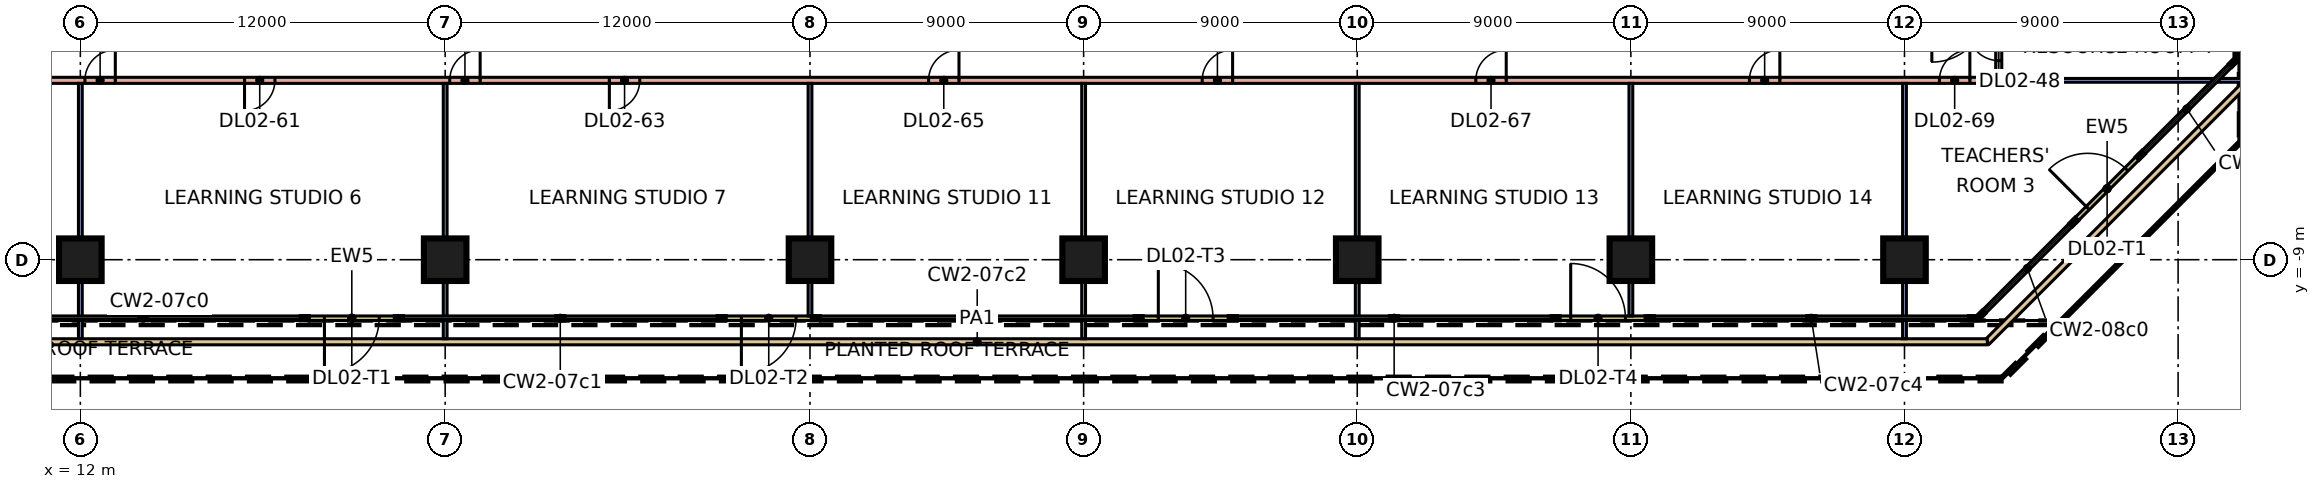
"""IFC4 building model, lengths in metres.
Left out: names, types, materials, properties, quantities, classifications, styles, units other than length and angle.
Written with IfcOpenShell. Run it as: python <this file> out.ifc"""

import sys

from ifc_helpers import new_model, si_unit, direction, frame, frame_2d, origin, origin_2d, place, context, subcontext, project, spatial, rectangle, extrude, element, fill, save


model = new_model("IFC4")
c1 = context("Model", 3, precision=1e-05, world=origin(), true_north=direction((0.0, 1.0)))
c2 = subcontext(c1, "Body", "Model", "MODEL_VIEW")
j1 = project(units=[si_unit("LENGTHUNIT", "METRE"), si_unit("PLANEANGLEUNIT", "RADIAN")], contexts=[c1])
p1 = place(None, origin())
s1 = spatial("IfcSite", under=j1, at=p1, CompositionType="ELEMENT")
p2 = place(p1, origin())
s2 = spatial("IfcBuilding", under=s1, at=p2, CompositionType="ELEMENT")
p3 = place(p2, frame((0.0, 0.0, 12.0)))
s3 = spatial("IfcBuildingStorey", under=s2, at=p3, CompositionType="ELEMENT", Elevation=12.0)
for number, where, z_axis, x_axis in (
    (1, (12.0, -9.0, 0.0), (0.0, 0.0, 1.0), (1.0, 0.0, 0.0)),
    (2, (24.0, -9.0, 0.0), (0.0, 0.0, 1.0), (1.0, 0.0, 0.0)),
    (3, (36.0, -9.0, 0.0), (0.0, 0.0, 1.0), (1.0, 0.0, 0.0)),
    (4, (45.0, -9.0, 0.0), (0.0, 0.0, 1.0), (1.0, 0.0, 0.0)),
    (5, (54.0, -9.0, 0.0), (0.0, 0.0, 1.0), (1.0, 0.0, 0.0)),
    (6, (63.0, -9.0, 0.0), (0.0, 0.0, 1.0), (1.0, 0.0, 0.0)),
    (7, (72.0, -9.0, 0.0), (0.0, 0.0, 1.0), (1.0, 0.0, 0.0)),
):
    element("IfcColumn", number, at=place(p3, frame(where, z_axis=z_axis, x_axis=x_axis)), inside=s3, PredefinedType="COLUMN", context=c2, shape_type="SweptSolid", body=[
        extrude(rectangle(XDim=1.4, YDim=1.4, at=origin_2d()), origin(), (0.0, 0.0, 1.0), 4.8),
    ])
p4 = place(p3, frame((19.429, -10.925, 0.0), z_axis=(0.0, 0.0, 1.0), x_axis=(1.0, 0.0, 0.0)))
e8 = element("IfcWall", 8, at=p4, inside=s3, PredefinedType="SOLIDWALL", context=c2, shape_type="SweptSolid", body=[
    extrude(rectangle(XDim=3.0, YDim=0.15, at=frame_2d((1.5, 0.0))), origin(), (0.0, 0.0, 1.0), 4.4),
])
p5 = place(p4, frame((0.6, 0.0, 0.0)))
e9 = element("IfcOpeningElement", 9, at=p5, cuts=e8, PredefinedType="OPENING", context=c2, shape_type="SweptSolid", body=[
    extrude(rectangle(XDim=1.8, YDim=2.4, at=frame_2d((0.9, 1.2))), frame((0.0, 0.085, 0.0), z_axis=(0.0, -1.0, 0.0), x_axis=(1.0, 0.0, 0.0)), (0.0, 0.0, 1.0), 0.17),
])
p6 = place(p3, frame((33.143, -10.925, 0.0), z_axis=(0.0, 0.0, 1.0), x_axis=(1.0, 0.0, 0.0)))
e10 = element("IfcWall", 10, at=p6, inside=s3, PredefinedType="SOLIDWALL", context=c2, shape_type="SweptSolid", body=[
    extrude(rectangle(XDim=3.0, YDim=0.15, at=frame_2d((1.5, 0.0))), origin(), (0.0, 0.0, 1.0), 4.4),
])
p7 = place(p6, frame((0.6, 0.0, 0.0)))
e11 = element("IfcOpeningElement", 11, at=p7, cuts=e10, PredefinedType="OPENING", context=c2, shape_type="SweptSolid", body=[
    extrude(rectangle(XDim=1.8, YDim=2.4, at=frame_2d((0.9, 1.2))), frame((0.0, 0.085, 0.0), z_axis=(0.0, -1.0, 0.0), x_axis=(1.0, 0.0, 0.0)), (0.0, 0.0, 1.0), 0.17),
])
p8 = place(p3, frame((46.857, -10.925, 0.0), z_axis=(0.0, 0.0, 1.0), x_axis=(1.0, 0.0, 0.0)))
e12 = element("IfcWall", 12, at=p8, inside=s3, PredefinedType="SOLIDWALL", context=c2, shape_type="SweptSolid", body=[
    extrude(rectangle(XDim=3.0, YDim=0.15, at=frame_2d((1.5, 0.0))), origin(), (0.0, 0.0, 1.0), 4.4),
])
p9 = place(p8, frame((0.6, 0.0, 0.0)))
e13 = element("IfcOpeningElement", 13, at=p9, cuts=e12, PredefinedType="OPENING", context=c2, shape_type="SweptSolid", body=[
    extrude(rectangle(XDim=1.8, YDim=2.4, at=frame_2d((0.9, 1.2))), frame((0.0, 0.085, 0.0), z_axis=(0.0, -1.0, 0.0), x_axis=(1.0, 0.0, 0.0)), (0.0, 0.0, 1.0), 0.17),
])
p10 = place(p3, frame((60.571, -10.925, 0.0), z_axis=(0.0, 0.0, 1.0), x_axis=(1.0, 0.0, 0.0)))
e14 = element("IfcWall", 14, at=p10, inside=s3, PredefinedType="SOLIDWALL", context=c2, shape_type="SweptSolid", body=[
    extrude(rectangle(XDim=3.0, YDim=0.15, at=frame_2d((1.5, 0.0))), origin(), (0.0, 0.0, 1.0), 4.4),
])
p11 = place(p10, frame((0.45, 0.0, 0.0)))
e15 = element("IfcOpeningElement", 15, at=p11, cuts=e14, PredefinedType="OPENING", context=c2, shape_type="SweptSolid", body=[
    extrude(rectangle(XDim=1.8, YDim=2.4, at=frame_2d((0.9, 1.2))), frame((0.0, 0.085, 0.0), z_axis=(0.0, -1.0, 0.0), x_axis=(1.0, 0.0, 0.0)), (0.0, 0.0, 1.0), 0.17),
])
p12 = place(p3, frame((77.604, -7.725, 0.0), z_axis=(0.0, 0.0, 1.0), x_axis=(0.707106781187, 0.707106781187, 0.0)))
e16 = element("IfcWall", 16, at=p12, inside=s3, PredefinedType="SOLIDWALL", context=c2, shape_type="SweptSolid", body=[
    extrude(rectangle(XDim=3.0, YDim=0.15, at=frame_2d((1.5, 0.0))), origin(), (0.0, 0.0, 1.0), 4.4),
])
p13 = place(p12, frame((0.6, 0.0, 0.0)))
e17 = element("IfcOpeningElement", 17, at=p13, cuts=e16, PredefinedType="OPENING", context=c2, shape_type="SweptSolid", body=[
    extrude(rectangle(XDim=1.8, YDim=2.4, at=frame_2d((0.9, 1.2))), frame((0.0, 0.085, 0.0), z_axis=(0.0, -1.0, 0.0), x_axis=(1.0, 0.0, 0.0)), (0.0, 0.0, 1.0), 0.17),
])
p14 = place(p3, frame((83.7, -2.725, 0.0), z_axis=(0.0, 0.0, 1.0), x_axis=(-0.707106781187, -0.707106781187, 0.0)))
e18 = element("IfcWall", 18, at=p14, inside=s3, PredefinedType="PARAPET", context=c2, shape_type="SweptSolid", body=[
    extrude(rectangle(XDim=12.692, YDim=0.2, at=frame_2d((6.346, 0.0))), origin(), (0.0, 0.0, 1.0), 0.5),
])
p15 = place(p3, frame((74.725, -11.7, 0.0), z_axis=(0.0, 0.0, 1.0), x_axis=(-1.0, 0.0, 0.0)))
e19 = element("IfcWall", 19, at=p15, inside=s3, PredefinedType="PARAPET", context=c2, shape_type="SweptSolid", body=[
    extrude(rectangle(XDim=66.45, YDim=0.2, at=frame_2d((33.225, 0.0))), origin(), (0.0, 0.0, 1.0), 0.5),
])
p16 = place(p3, frame((-0.184, -3.1, 0.0), z_axis=(0.0, 0.0, 1.0), x_axis=(1.0, 0.0, 0.0)))
e20 = element("IfcWall", 20, at=p16, inside=s3, PredefinedType="PARTITIONING", context=c2, shape_type="SweptSolid", body=[
    extrude(rectangle(XDim=75.284, YDim=0.2, at=frame_2d((37.642, 0.0))), origin(), (0.0, 0.0, 1.0), 4.4),
])
p17 = place(p16, frame((6.105, 0.0, 0.0)))
e21 = element("IfcOpeningElement", 21, at=p17, cuts=e20, PredefinedType="OPENING", context=c2, shape_type="SweptSolid", body=[
    extrude(rectangle(XDim=1.0, YDim=2.1, at=frame_2d((0.5, 1.05))), frame((0.0, 0.11, 0.0), z_axis=(0.0, -1.0, 0.0), x_axis=(1.0, 0.0, 0.0)), (0.0, 0.0, 1.0), 0.22),
])
p18 = place(p16, frame((17.584, 0.0, 0.0)))
e22 = element("IfcOpeningElement", 22, at=p18, cuts=e20, PredefinedType="OPENING", context=c2, shape_type="SweptSolid", body=[
    extrude(rectangle(XDim=1.0, YDim=2.1, at=frame_2d((0.5, 1.05))), frame((0.0, 0.11, 0.0), z_axis=(0.0, -1.0, 0.0), x_axis=(1.0, 0.0, 0.0)), (0.0, 0.0, 1.0), 0.22),
])
p19 = place(p16, frame((12.334, 0.0, 0.0)))
e23 = element("IfcOpeningElement", 23, at=p19, cuts=e20, PredefinedType="OPENING", context=c2, shape_type="SweptSolid", body=[
    extrude(rectangle(XDim=1.0, YDim=2.1, at=frame_2d((0.5, 1.05))), frame((0.0, 0.11, 0.0), z_axis=(0.0, -1.0, 0.0), x_axis=(1.0, 0.0, 0.0)), (0.0, 0.0, 1.0), 0.22),
])
p20 = place(p16, frame((29.584, 0.0, 0.0)))
e24 = element("IfcOpeningElement", 24, at=p20, cuts=e20, PredefinedType="OPENING", context=c2, shape_type="SweptSolid", body=[
    extrude(rectangle(XDim=1.0, YDim=2.1, at=frame_2d((0.5, 1.05))), frame((0.0, 0.11, 0.0), z_axis=(0.0, -1.0, 0.0), x_axis=(1.0, 0.0, 0.0)), (0.0, 0.0, 1.0), 0.22),
])
p21 = place(p16, frame((24.334, 0.0, 0.0)))
e25 = element("IfcOpeningElement", 25, at=p21, cuts=e20, PredefinedType="OPENING", context=c2, shape_type="SweptSolid", body=[
    extrude(rectangle(XDim=1.0, YDim=2.1, at=frame_2d((0.5, 1.05))), frame((0.0, 0.11, 0.0), z_axis=(0.0, -1.0, 0.0), x_axis=(1.0, 0.0, 0.0)), (0.0, 0.0, 1.0), 0.22),
])
p22 = place(p16, frame((40.084, 0.0, 0.0)))
e26 = element("IfcOpeningElement", 26, at=p22, cuts=e20, PredefinedType="OPENING", context=c2, shape_type="SweptSolid", body=[
    extrude(rectangle(XDim=1.0, YDim=2.1, at=frame_2d((0.5, 1.05))), frame((0.0, 0.11, 0.0), z_axis=(0.0, -1.0, 0.0), x_axis=(1.0, 0.0, 0.0)), (0.0, 0.0, 1.0), 0.22),
])
p23 = place(p16, frame((49.084, 0.0, 0.0)))
e27 = element("IfcOpeningElement", 27, at=p23, cuts=e20, PredefinedType="OPENING", context=c2, shape_type="SweptSolid", body=[
    extrude(rectangle(XDim=1.0, YDim=2.1, at=frame_2d((0.5, 1.05))), frame((0.0, 0.11, 0.0), z_axis=(0.0, -1.0, 0.0), x_axis=(1.0, 0.0, 0.0)), (0.0, 0.0, 1.0), 0.22),
])
p24 = place(p16, frame((58.084, 0.0, 0.0)))
e28 = element("IfcOpeningElement", 28, at=p24, cuts=e20, PredefinedType="OPENING", context=c2, shape_type="SweptSolid", body=[
    extrude(rectangle(XDim=1.0, YDim=2.1, at=frame_2d((0.5, 1.05))), frame((0.0, 0.11, 0.0), z_axis=(0.0, -1.0, 0.0), x_axis=(1.0, 0.0, 0.0)), (0.0, 0.0, 1.0), 0.22),
])
p25 = place(p16, frame((67.084, 0.0, 0.0)))
e29 = element("IfcOpeningElement", 29, at=p25, cuts=e20, PredefinedType="OPENING", context=c2, shape_type="SweptSolid", body=[
    extrude(rectangle(XDim=1.0, YDim=2.1, at=frame_2d((0.5, 1.05))), frame((0.0, 0.11, 0.0), z_axis=(0.0, -1.0, 0.0), x_axis=(1.0, 0.0, 0.0)), (0.0, 0.0, 1.0), 0.22),
])
p26 = place(p16, frame((73.334, 0.0, 0.0)))
e30 = element("IfcOpeningElement", 30, at=p26, cuts=e20, PredefinedType="OPENING", context=c2, shape_type="SweptSolid", body=[
    extrude(rectangle(XDim=1.0, YDim=2.1, at=frame_2d((0.5, 1.05))), frame((0.0, 0.11, 0.0), z_axis=(0.0, -1.0, 0.0), x_axis=(1.0, 0.0, 0.0)), (0.0, 0.0, 1.0), 0.22),
])
for number, where, z_axis, x_axis in (
    (31, (12.0, -11.6, 0.0), (0.0, 0.0, 1.0), (0.0, 1.0, 0.0)),
    (32, (24.0, -11.6, 0.0), (0.0, 0.0, 1.0), (0.0, 1.0, 0.0)),
):
    element("IfcWall", number, at=place(p3, frame(where, z_axis=z_axis, x_axis=x_axis)), inside=s3, PredefinedType="PARTITIONING", context=c2, shape_type="SweptSolid", body=[
        extrude(rectangle(XDim=8.4, YDim=0.125, at=frame_2d((4.2, 0.0))), origin(), (0.0, 0.0, 1.0), 4.4),
    ])
p27 = place(p3, frame((36.0, -10.851, 0.0), z_axis=(0.0, 0.0, 1.0), x_axis=(0.0, 1.0, 0.0)))
e33 = element("IfcWall", 33, at=p27, inside=s3, PredefinedType="PARTITIONING", context=c2, shape_type="SweptSolid", body=[
    extrude(rectangle(XDim=7.651, YDim=0.125, at=frame_2d((3.826, 0.0))), origin(), (0.0, 0.0, 1.0), 4.4),
])
for number, where, z_axis, x_axis in (
    (34, (45.0, -11.6, 0.0), (0.0, 0.0, 1.0), (0.0, 1.0, 0.0)),
    (35, (54.0, -11.6, 0.0), (0.0, 0.0, 1.0), (0.0, 1.0, 0.0)),
):
    element("IfcWall", number, at=place(p3, frame(where, z_axis=z_axis, x_axis=x_axis)), inside=s3, PredefinedType="PARTITIONING", context=c2, shape_type="SweptSolid", body=[
        extrude(rectangle(XDim=8.4, YDim=0.125, at=frame_2d((4.2, 0.0))), origin(), (0.0, 0.0, 1.0), 4.4),
    ])
p28 = place(p3, frame((63.0, -10.851, 0.0), z_axis=(0.0, 0.0, 1.0), x_axis=(0.0, 1.0, 0.0)))
e36 = element("IfcWall", 36, at=p28, inside=s3, PredefinedType="PARTITIONING", context=c2, shape_type="SweptSolid", body=[
    extrude(rectangle(XDim=7.651, YDim=0.125, at=frame_2d((3.826, 0.0))), origin(), (0.0, 0.0, 1.0), 4.4),
])
p29 = place(p3, frame((72.0, -11.6, 0.0), z_axis=(0.0, 0.0, 1.0), x_axis=(0.0, 1.0, 0.0)))
e37 = element("IfcWall", 37, at=p29, inside=s3, PredefinedType="PARTITIONING", context=c2, shape_type="SweptSolid", body=[
    extrude(rectangle(XDim=8.4, YDim=0.125, at=frame_2d((4.2, 0.0))), origin(), (0.0, 0.0, 1.0), 4.4),
])
p30 = place(p3, frame((75.1, -3.1, 0.0), z_axis=(0.0, 0.0, 1.0), x_axis=(1.0, 0.0, 0.0)))
e38 = element("IfcWall", 38, at=p30, inside=s3, PredefinedType="PARTITIONING", context=c2, shape_type="SweptSolid", body=[
    extrude(rectangle(XDim=8.083, YDim=0.125, at=frame_2d((4.042, 0.0))), origin(), (0.0, 0.0, 1.0), 4.4),
])
p31 = place(p3, frame((75.1, -3.0, 0.0), z_axis=(0.0, 0.0, 1.0), x_axis=(0.0, 1.0, 0.0)))
e39 = element("IfcWall", 39, at=p31, inside=s3, PredefinedType="PARTITIONING", context=c2, shape_type="SweptSolid", body=[
    extrude(rectangle(XDim=30.0, YDim=0.2, at=frame_2d((15.0, 0.0))), origin(), (0.0, 0.0, 1.0), 4.4),
])
p32 = place(p31, frame((0.55, 0.0, 0.0)))
e40 = element("IfcOpeningElement", 40, at=p32, cuts=e39, PredefinedType="OPENING", context=c2, shape_type="SweptSolid", body=[
    extrude(rectangle(XDim=1.0, YDim=2.1, at=frame_2d((0.5, 1.05))), frame((0.0, 0.11, 0.0), z_axis=(0.0, -1.0, 0.0), x_axis=(1.0, 0.0, 0.0)), (0.0, 0.0, 1.0), 0.22),
])
p33 = place(p31, frame((8.4, 0.0, 0.0)))
e41 = element("IfcOpeningElement", 41, at=p33, cuts=e39, PredefinedType="OPENING", context=c2, shape_type="SweptSolid", body=[
    extrude(rectangle(XDim=1.0, YDim=2.1, at=frame_2d((0.5, 1.05))), frame((0.0, 0.11, 0.0), z_axis=(0.0, -1.0, 0.0), x_axis=(1.0, 0.0, 0.0)), (0.0, 0.0, 1.0), 0.22),
])
p34 = place(p31, frame((3.15, 0.0, 0.0)))
e42 = element("IfcOpeningElement", 42, at=p34, cuts=e39, PredefinedType="OPENING", context=c2, shape_type="SweptSolid", body=[
    extrude(rectangle(XDim=1.0, YDim=2.1, at=frame_2d((0.5, 1.05))), frame((0.0, 0.11, 0.0), z_axis=(0.0, -1.0, 0.0), x_axis=(1.0, 0.0, 0.0)), (0.0, 0.0, 1.0), 0.22),
])
p35 = place(p31, frame((22.25, 0.0, 0.0)))
e43 = element("IfcOpeningElement", 43, at=p35, cuts=e39, PredefinedType="OPENING", context=c2, shape_type="SweptSolid", body=[
    extrude(rectangle(XDim=1.0, YDim=2.1, at=frame_2d((0.5, 1.05))), frame((0.0, 0.11, 0.0), z_axis=(0.0, -1.0, 0.0), x_axis=(1.0, 0.0, 0.0)), (0.0, 0.0, 1.0), 0.22),
])
p36 = place(p31, frame((18.75, 0.0, 0.0)))
e44 = element("IfcOpeningElement", 44, at=p36, cuts=e39, PredefinedType="OPENING", context=c2, shape_type="SweptSolid", body=[
    extrude(rectangle(XDim=1.0, YDim=2.1, at=frame_2d((0.5, 1.05))), frame((0.0, 0.11, 0.0), z_axis=(0.0, -1.0, 0.0), x_axis=(1.0, 0.0, 0.0)), (0.0, 0.0, 1.0), 0.22),
])
p37 = place(p31, frame((28.35, 0.0, 0.0)))
e45 = element("IfcOpeningElement", 45, at=p37, cuts=e39, PredefinedType="OPENING", context=c2, shape_type="SweptSolid", body=[
    extrude(rectangle(XDim=1.0, YDim=2.1, at=frame_2d((0.5, 1.05))), frame((0.0, 0.11, 0.0), z_axis=(0.0, -1.0, 0.0), x_axis=(1.0, 0.0, 0.0)), (0.0, 0.0, 1.0), 0.22),
])
p38 = place(p5, frame((1.8, 0.0, 0.0), z_axis=(0.0, 0.0, 1.0), x_axis=(-1.0, 0.0, 0.0)))
e46 = element("IfcDoor", 46, at=p38, inside=s3, OperationType="DOUBLE_DOOR_SINGLE_SWING", PredefinedType="DOOR", context=c2, shape_type="SweptSolid", body=[
    extrude(rectangle(XDim=1.8, YDim=2.4, at=frame_2d((0.9, 1.2))), frame((0.0, 0.025, 0.0), z_axis=(0.0, -1.0, 0.0), x_axis=(1.0, 0.0, 0.0)), (0.0, 0.0, 1.0), 0.05),
])
fill(e9, e46)
p39 = place(p7, frame((1.8, 0.0, 0.0), z_axis=(0.0, 0.0, 1.0), x_axis=(-1.0, 0.0, 0.0)))
e47 = element("IfcDoor", 47, at=p39, inside=s3, OperationType="DOUBLE_DOOR_SINGLE_SWING", PredefinedType="DOOR", context=c2, shape_type="SweptSolid", body=[
    extrude(rectangle(XDim=1.8, YDim=2.4, at=frame_2d((0.9, 1.2))), frame((0.0, 0.025, 0.0), z_axis=(0.0, -1.0, 0.0), x_axis=(1.0, 0.0, 0.0)), (0.0, 0.0, 1.0), 0.05),
])
fill(e11, e47)
p40 = place(p9, origin())
e48 = element("IfcDoor", 48, at=p40, inside=s3, OperationType="DOUBLE_DOOR_SINGLE_SWING", PredefinedType="DOOR", context=c2, shape_type="SweptSolid", body=[
    extrude(rectangle(XDim=1.8, YDim=2.4, at=frame_2d((0.9, 1.2))), frame((0.0, 0.025, 0.0), z_axis=(0.0, -1.0, 0.0), x_axis=(1.0, 0.0, 0.0)), (0.0, 0.0, 1.0), 0.05),
])
fill(e13, e48)
p41 = place(p11, origin())
e49 = element("IfcDoor", 49, at=p41, inside=s3, OperationType="DOUBLE_DOOR_SINGLE_SWING", PredefinedType="DOOR", context=c2, shape_type="SweptSolid", body=[
    extrude(rectangle(XDim=1.8, YDim=2.4, at=frame_2d((0.9, 1.2))), frame((0.0, 0.025, 0.0), z_axis=(0.0, -1.0, 0.0), x_axis=(1.0, 0.0, 0.0)), (0.0, 0.0, 1.0), 0.05),
])
fill(e15, e49)
p42 = place(p13, origin())
e50 = element("IfcDoor", 50, at=p42, inside=s3, OperationType="DOUBLE_DOOR_SINGLE_SWING", PredefinedType="DOOR", context=c2, shape_type="SweptSolid", body=[
    extrude(rectangle(XDim=1.8, YDim=2.4, at=frame_2d((0.9, 1.2))), frame((0.0, 0.025, 0.0), z_axis=(0.0, -1.0, 0.0), x_axis=(1.0, 0.0, 0.0)), (0.0, 0.0, 1.0), 0.05),
])
fill(e17, e50)
p43 = place(p32, frame((1.0, 0.0, 0.0), z_axis=(0.0, 0.0, 1.0), x_axis=(-1.0, 0.0, 0.0)))
e51 = element("IfcDoor", 51, at=p43, inside=s3, OperationType="SINGLE_SWING_RIGHT", PredefinedType="DOOR", context=c2, shape_type="SweptSolid", body=[
    extrude(rectangle(XDim=1.0, YDim=2.1, at=frame_2d((0.5, 1.05))), frame((0.0, 0.025, 0.0), z_axis=(0.0, -1.0, 0.0), x_axis=(1.0, 0.0, 0.0)), (0.0, 0.0, 1.0), 0.05),
])
fill(e40, e51)
p44 = place(p18, frame((1.0, 0.0, 0.0), z_axis=(0.0, 0.0, 1.0), x_axis=(-1.0, 0.0, 0.0)))
e52 = element("IfcDoor", 52, at=p44, inside=s3, OperationType="SINGLE_SWING_LEFT", PredefinedType="DOOR", context=c2, shape_type="SweptSolid", body=[
    extrude(rectangle(XDim=1.0, YDim=2.1, at=frame_2d((0.5, 1.05))), frame((0.0, 0.025, 0.0), z_axis=(0.0, -1.0, 0.0), x_axis=(1.0, 0.0, 0.0)), (0.0, 0.0, 1.0), 0.05),
])
fill(e22, e52)
p45 = place(p19, frame((1.0, 0.0, 0.0), z_axis=(0.0, 0.0, 1.0), x_axis=(-1.0, 0.0, 0.0)))
e53 = element("IfcDoor", 53, at=p45, inside=s3, OperationType="SINGLE_SWING_RIGHT", PredefinedType="DOOR", context=c2, shape_type="SweptSolid", body=[
    extrude(rectangle(XDim=1.0, YDim=2.1, at=frame_2d((0.5, 1.05))), frame((0.0, 0.025, 0.0), z_axis=(0.0, -1.0, 0.0), x_axis=(1.0, 0.0, 0.0)), (0.0, 0.0, 1.0), 0.05),
])
fill(e23, e53)
p46 = place(p20, frame((1.0, 0.0, 0.0), z_axis=(0.0, 0.0, 1.0), x_axis=(-1.0, 0.0, 0.0)))
e54 = element("IfcDoor", 54, at=p46, inside=s3, OperationType="SINGLE_SWING_LEFT", PredefinedType="DOOR", context=c2, shape_type="SweptSolid", body=[
    extrude(rectangle(XDim=1.0, YDim=2.1, at=frame_2d((0.5, 1.05))), frame((0.0, 0.025, 0.0), z_axis=(0.0, -1.0, 0.0), x_axis=(1.0, 0.0, 0.0)), (0.0, 0.0, 1.0), 0.05),
])
fill(e24, e54)
p47 = place(p21, frame((1.0, 0.0, 0.0), z_axis=(0.0, 0.0, 1.0), x_axis=(-1.0, 0.0, 0.0)))
e55 = element("IfcDoor", 55, at=p47, inside=s3, OperationType="SINGLE_SWING_RIGHT", PredefinedType="DOOR", context=c2, shape_type="SweptSolid", body=[
    extrude(rectangle(XDim=1.0, YDim=2.1, at=frame_2d((0.5, 1.05))), frame((0.0, 0.025, 0.0), z_axis=(0.0, -1.0, 0.0), x_axis=(1.0, 0.0, 0.0)), (0.0, 0.0, 1.0), 0.05),
])
fill(e25, e55)
p48 = place(p22, frame((1.0, 0.0, 0.0), z_axis=(0.0, 0.0, 1.0), x_axis=(-1.0, 0.0, 0.0)))
e56 = element("IfcDoor", 56, at=p48, inside=s3, OperationType="SINGLE_SWING_RIGHT", PredefinedType="DOOR", context=c2, shape_type="SweptSolid", body=[
    extrude(rectangle(XDim=1.0, YDim=2.1, at=frame_2d((0.5, 1.05))), frame((0.0, 0.025, 0.0), z_axis=(0.0, -1.0, 0.0), x_axis=(1.0, 0.0, 0.0)), (0.0, 0.0, 1.0), 0.05),
])
fill(e26, e56)
p49 = place(p23, frame((1.0, 0.0, 0.0), z_axis=(0.0, 0.0, 1.0), x_axis=(-1.0, 0.0, 0.0)))
e57 = element("IfcDoor", 57, at=p49, inside=s3, OperationType="SINGLE_SWING_RIGHT", PredefinedType="DOOR", context=c2, shape_type="SweptSolid", body=[
    extrude(rectangle(XDim=1.0, YDim=2.1, at=frame_2d((0.5, 1.05))), frame((0.0, 0.025, 0.0), z_axis=(0.0, -1.0, 0.0), x_axis=(1.0, 0.0, 0.0)), (0.0, 0.0, 1.0), 0.05),
])
fill(e27, e57)
p50 = place(p24, frame((1.0, 0.0, 0.0), z_axis=(0.0, 0.0, 1.0), x_axis=(-1.0, 0.0, 0.0)))
e58 = element("IfcDoor", 58, at=p50, inside=s3, OperationType="SINGLE_SWING_RIGHT", PredefinedType="DOOR", context=c2, shape_type="SweptSolid", body=[
    extrude(rectangle(XDim=1.0, YDim=2.1, at=frame_2d((0.5, 1.05))), frame((0.0, 0.025, 0.0), z_axis=(0.0, -1.0, 0.0), x_axis=(1.0, 0.0, 0.0)), (0.0, 0.0, 1.0), 0.05),
])
fill(e28, e58)
p51 = place(p25, frame((1.0, 0.0, 0.0), z_axis=(0.0, 0.0, 1.0), x_axis=(-1.0, 0.0, 0.0)))
e59 = element("IfcDoor", 59, at=p51, inside=s3, OperationType="SINGLE_SWING_RIGHT", PredefinedType="DOOR", context=c2, shape_type="SweptSolid", body=[
    extrude(rectangle(XDim=1.0, YDim=2.1, at=frame_2d((0.5, 1.05))), frame((0.0, 0.025, 0.0), z_axis=(0.0, -1.0, 0.0), x_axis=(1.0, 0.0, 0.0)), (0.0, 0.0, 1.0), 0.05),
])
fill(e29, e59)
p52 = place(p26, frame((1.0, 0.0, 0.0), z_axis=(0.0, 0.0, 1.0), x_axis=(-1.0, 0.0, 0.0)))
e60 = element("IfcDoor", 60, at=p52, inside=s3, OperationType="SINGLE_SWING_RIGHT", PredefinedType="DOOR", context=c2, shape_type="SweptSolid", body=[
    extrude(rectangle(XDim=1.0, YDim=2.1, at=frame_2d((0.5, 1.05))), frame((0.0, 0.025, 0.0), z_axis=(0.0, -1.0, 0.0), x_axis=(1.0, 0.0, 0.0)), (0.0, 0.0, 1.0), 0.05),
])
fill(e30, e60)
save(model, sys.argv[1])
